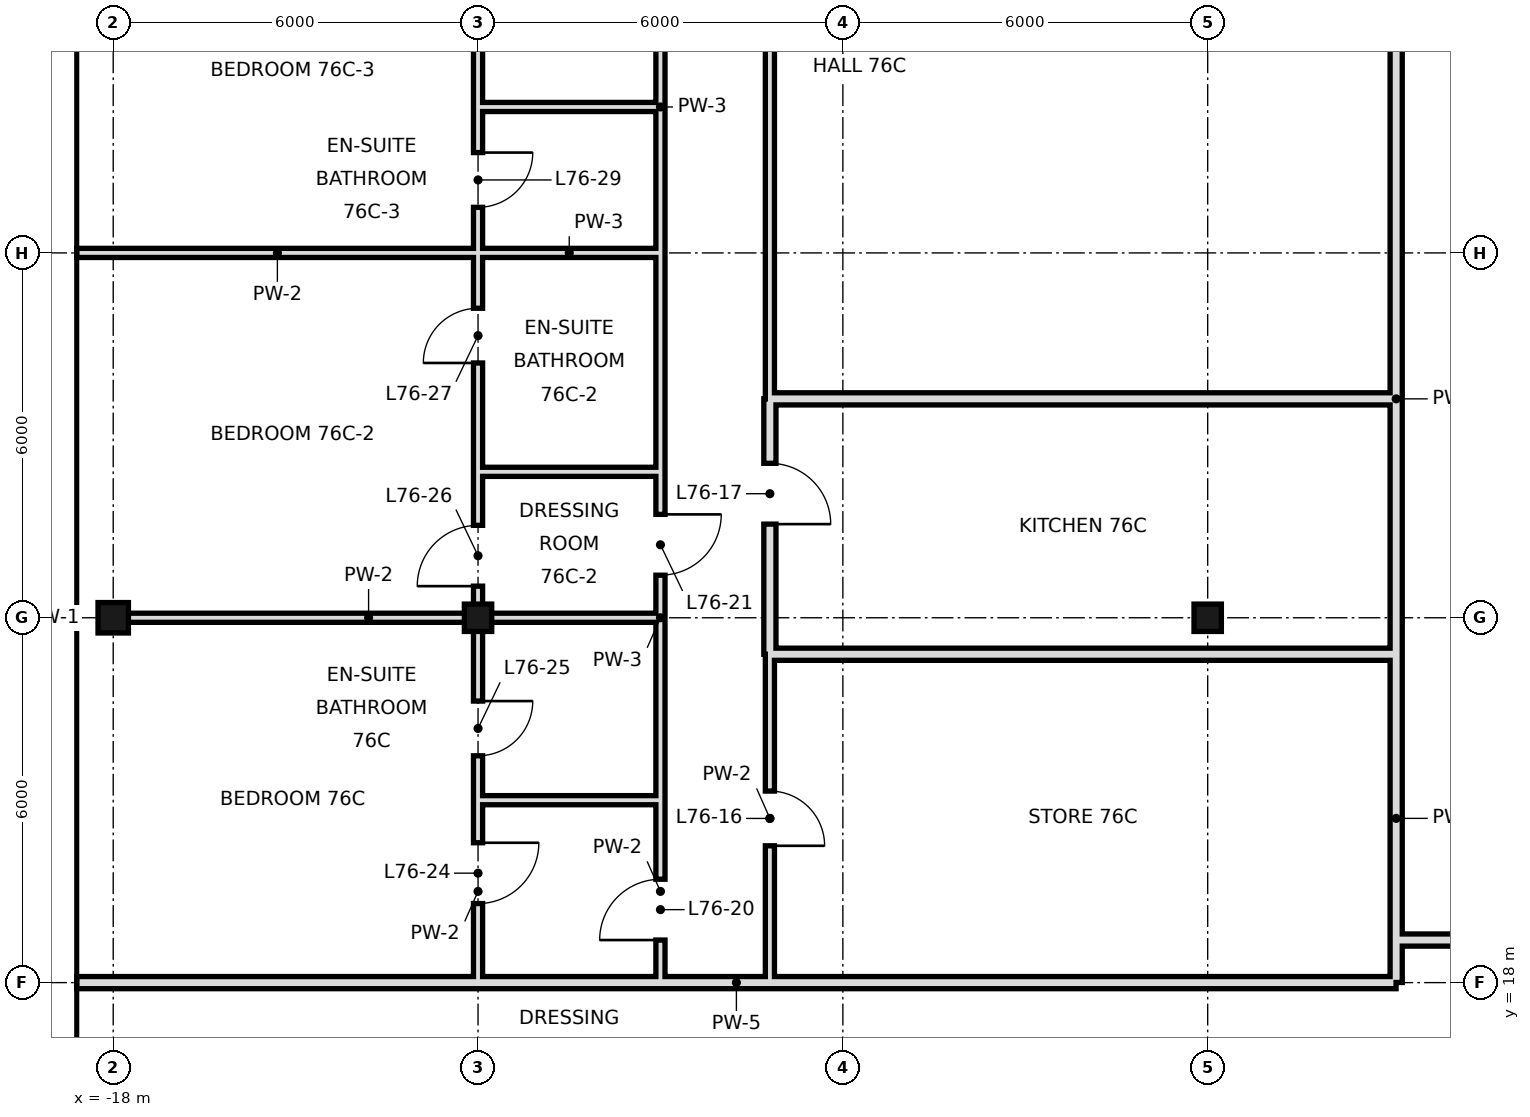
"""IFC4 building model, lengths in metres.
Left out: names, types, materials, properties, quantities, classifications, styles, units other than length and angle.
Written with IfcOpenShell. Run it as: python <this file> out.ifc"""

import sys

from ifc_helpers import new_model, si_unit, direction, frame, frame_2d, origin, origin_2d, place, context, subcontext, project, spatial, rectangle, hollow_rectangle, extrude, element, fill, save


model = new_model("IFC4")
c1 = context("Model", 3, precision=1e-05, world=origin(), true_north=direction((0.0, 1.0)))
c2 = subcontext(c1, "Body", "Model", "MODEL_VIEW")
j1 = project(units=[si_unit("LENGTHUNIT", "METRE"), si_unit("PLANEANGLEUNIT", "RADIAN")], contexts=[c1])
p1 = place(None, origin())
s1 = spatial("IfcSite", under=j1, at=p1, CompositionType="ELEMENT")
p2 = place(p1, origin())
s2 = spatial("IfcBuilding", under=s1, at=p2, CompositionType="ELEMENT")
p3 = place(p2, frame((0.0, 0.0, 319.6)))
s3 = spatial("IfcBuildingStorey", under=s2, at=p3, CompositionType="ELEMENT", Elevation=319.6)
p4 = place(p3, frame((-18.0, 24.0, 0.0), z_axis=(0.0, 0.0, 1.0), x_axis=(1.0, 0.0, 0.0)))
e1 = element("IfcColumn", 1, at=p4, inside=s3, PredefinedType="COLUMN", context=c2, shape_type="SweptSolid", body=[
    extrude(hollow_rectangle(XDim=0.5, YDim=0.5, WallThickness=0.025, at=origin_2d()), origin(), (0.0, 0.0, 1.0), 3.6),
])
for number, where, z_axis, x_axis in (
    (2, (-12.0, 24.0, 0.0), (0.0, 0.0, 1.0), (1.0, 0.0, 0.0)),
    (3, (0.0, 24.0, 0.0), (0.0, 0.0, 1.0), (1.0, 0.0, 0.0)),
):
    element("IfcColumn", number, at=place(p3, frame(where, z_axis=z_axis, x_axis=x_axis)), inside=s3, PredefinedType="COLUMN", context=c2, shape_type="SweptSolid", body=[
        extrude(hollow_rectangle(XDim=0.45, YDim=0.45, WallThickness=0.022, at=origin_2d()), origin(), (0.0, 0.0, 1.0), 3.6),
    ])
p5 = place(p3, frame((-12.0, 18.0, 0.0), z_axis=(0.0, 0.0, 1.0), x_axis=(0.0, 1.0, 0.0)))
e4 = element("IfcWall", 4, at=p5, inside=s3, PredefinedType="PARTITIONING", context=c2, shape_type="SweptSolid", body=[
    extrude(rectangle(XDim=3.0, YDim=0.15, at=frame_2d((1.5, 0.0))), origin(), (0.0, 0.0, 1.0), 2.72),
])
p6 = place(p5, frame((1.3, 0.0, 0.0)))
e5 = element("IfcOpeningElement", 5, at=p6, cuts=e4, PredefinedType="OPENING", context=c2, shape_type="SweptSolid", body=[
    extrude(rectangle(XDim=1.0, YDim=2.4, at=frame_2d((0.5, 1.2))), frame((0.0, 0.085, 0.0), z_axis=(0.0, -1.0, 0.0), x_axis=(1.0, 0.0, 0.0)), (0.0, 0.0, 1.0), 0.17),
])
p7 = place(p3, frame((-12.0, 24.0, 0.0), z_axis=(0.0, 0.0, 1.0), x_axis=(0.0, 1.0, 0.0)))
e6 = element("IfcWall", 6, at=p7, inside=s3, PredefinedType="PARTITIONING", context=c2, shape_type="SweptSolid", body=[
    extrude(rectangle(XDim=2.4, YDim=0.15, at=frame_2d((1.2, 0.0))), origin(), (0.0, 0.0, 1.0), 2.72),
])
p8 = place(p7, frame((0.52, 0.0, 0.0)))
e7 = element("IfcOpeningElement", 7, at=p8, cuts=e6, PredefinedType="OPENING", context=c2, shape_type="SweptSolid", body=[
    extrude(rectangle(XDim=1.0, YDim=2.4, at=frame_2d((0.5, 1.2))), frame((0.0, 0.085, 0.0), z_axis=(0.0, -1.0, 0.0), x_axis=(1.0, 0.0, 0.0)), (0.0, 0.0, 1.0), 0.17),
])
p9 = place(p3, frame((-12.0, 32.4, 0.0), z_axis=(0.0, 0.0, 1.0), x_axis=(0.0, 1.0, 0.0)))
e8 = element("IfcWall", 8, at=p9, inside=s3, PredefinedType="PARTITIONING", context=c2, shape_type="SweptSolid", body=[
    extrude(rectangle(XDim=15.6, YDim=0.15, at=frame_2d((7.8, 0.0))), origin(), (0.0, 0.0, 1.0), 2.72),
])
p10 = place(p9, frame((1.3, 0.0, 0.0)))
e9 = element("IfcOpeningElement", 9, at=p10, cuts=e8, PredefinedType="OPENING", context=c2, shape_type="SweptSolid", body=[
    extrude(rectangle(XDim=1.0, YDim=2.4, at=frame_2d((0.5, 1.2))), frame((0.0, 0.085, 0.0), z_axis=(0.0, -1.0, 0.0), x_axis=(1.0, 0.0, 0.0)), (0.0, 0.0, 1.0), 0.17),
])
p11 = place(p9, frame((8.7, 0.0, 0.0)))
e10 = element("IfcOpeningElement", 10, at=p11, cuts=e8, PredefinedType="OPENING", context=c2, shape_type="SweptSolid", body=[
    extrude(rectangle(XDim=1.8, YDim=2.4, at=frame_2d((0.9, 1.2))), frame((0.0, 0.085, 0.0), z_axis=(0.0, -1.0, 0.0), x_axis=(1.0, 0.0, 0.0)), (0.0, 0.0, 1.0), 0.17),
])
p12 = place(p3, frame((-12.0, 21.0, 0.0), z_axis=(0.0, 0.0, 1.0), x_axis=(0.0, 1.0, 0.0)))
e11 = element("IfcWall", 11, at=p12, inside=s3, PredefinedType="PARTITIONING", context=c2, shape_type="SweptSolid", body=[
    extrude(rectangle(XDim=3.0, YDim=0.15, at=frame_2d((1.5, 0.0))), origin(), (0.0, 0.0, 1.0), 2.72),
])
p13 = place(p12, frame((0.73, 0.0, 0.0)))
e12 = element("IfcOpeningElement", 12, at=p13, cuts=e11, PredefinedType="OPENING", context=c2, shape_type="SweptSolid", body=[
    extrude(rectangle(XDim=0.9, YDim=2.4, at=frame_2d((0.45, 1.2))), frame((0.0, 0.085, 0.0), z_axis=(0.0, -1.0, 0.0), x_axis=(1.0, 0.0, 0.0)), (0.0, 0.0, 1.0), 0.17),
])
p14 = place(p3, frame((-12.0, 26.4, 0.0), z_axis=(0.0, 0.0, 1.0), x_axis=(0.0, 1.0, 0.0)))
e13 = element("IfcWall", 13, at=p14, inside=s3, PredefinedType="PARTITIONING", context=c2, shape_type="SweptSolid", body=[
    extrude(rectangle(XDim=6.0, YDim=0.15, at=frame_2d((3.0, 0.0))), origin(), (0.0, 0.0, 1.0), 2.72),
])
p15 = place(p14, frame((1.79, 0.0, 0.0)))
e14 = element("IfcOpeningElement", 14, at=p15, cuts=e13, PredefinedType="OPENING", context=c2, shape_type="SweptSolid", body=[
    extrude(rectangle(XDim=0.9, YDim=2.4, at=frame_2d((0.45, 1.2))), frame((0.0, 0.085, 0.0), z_axis=(0.0, -1.0, 0.0), x_axis=(1.0, 0.0, 0.0)), (0.0, 0.0, 1.0), 0.17),
])
p16 = place(p14, frame((4.35, 0.0, 0.0)))
e15 = element("IfcOpeningElement", 15, at=p16, cuts=e13, PredefinedType="OPENING", context=c2, shape_type="SweptSolid", body=[
    extrude(rectangle(XDim=0.9, YDim=2.4, at=frame_2d((0.45, 1.2))), frame((0.0, 0.085, 0.0), z_axis=(0.0, -1.0, 0.0), x_axis=(1.0, 0.0, 0.0)), (0.0, 0.0, 1.0), 0.17),
])
p17 = place(p3, frame((-7.2, 23.4, 0.0), z_axis=(0.0, 0.0, 1.0), x_axis=(0.0, 1.0, 0.0)))
e16 = element("IfcWall", 16, at=p17, inside=s3, PredefinedType="SOLIDWALL", context=c2, shape_type="SweptSolid", body=[
    extrude(rectangle(XDim=4.2, YDim=0.2, at=frame_2d((2.1, 0.0))), origin(), (0.0, 0.0, 1.0), 2.72),
])
p18 = place(p17, frame((2.14, 0.0, 0.0)))
e17 = element("IfcOpeningElement", 17, at=p18, cuts=e16, PredefinedType="OPENING", context=c2, shape_type="SweptSolid", body=[
    extrude(rectangle(XDim=1.0, YDim=2.4, at=frame_2d((0.5, 1.2))), frame((0.0, 0.11, 0.0), z_axis=(0.0, -1.0, 0.0), x_axis=(1.0, 0.0, 0.0)), (0.0, 0.0, 1.0), 0.22),
])
p19 = place(p3, frame((-7.2, 18.0, 0.0), z_axis=(0.0, 0.0, 1.0), x_axis=(0.0, 1.0, 0.0)))
e18 = element("IfcWall", 18, at=p19, inside=s3, PredefinedType="PARTITIONING", context=c2, shape_type="SweptSolid", body=[
    extrude(rectangle(XDim=5.4, YDim=0.15, at=frame_2d((2.7, 0.0))), origin(), (0.0, 0.0, 1.0), 3.42),
])
p20 = place(p19, frame((2.25, 0.0, 0.0)))
e19 = element("IfcOpeningElement", 19, at=p20, cuts=e18, PredefinedType="OPENING", context=c2, shape_type="SweptSolid", body=[
    extrude(rectangle(XDim=0.9, YDim=2.1, at=frame_2d((0.45, 1.05))), frame((0.0, 0.085, 0.0), z_axis=(0.0, -1.0, 0.0), x_axis=(1.0, 0.0, 0.0)), (0.0, 0.0, 1.0), 0.17),
])
p21 = place(p3, frame((-7.2, 27.6, 0.0), z_axis=(0.0, 0.0, 1.0), x_axis=(0.0, 1.0, 0.0)))
e20 = element("IfcWall", 20, at=p21, inside=s3, PredefinedType="PARTITIONING", context=c2, shape_type="SweptSolid", body=[
    extrude(rectangle(XDim=18.0, YDim=0.15, at=frame_2d((9.0, 0.0))), origin(), (0.0, 0.0, 1.0), 3.42),
])
p22 = place(p21, frame((15.4, 0.0, 0.0)))
e21 = element("IfcOpeningElement", 21, at=p22, cuts=e20, PredefinedType="OPENING", context=c2, shape_type="SweptSolid", body=[
    extrude(rectangle(XDim=1.0, YDim=2.4, at=frame_2d((0.5, 1.2))), frame((0.0, 0.085, 0.0), z_axis=(0.0, -1.0, 0.0), x_axis=(1.0, 0.0, 0.0)), (0.0, 0.0, 1.0), 0.17),
])
p23 = place(p21, frame((7.6, 0.0, 0.0)))
e22 = element("IfcOpeningElement", 22, at=p23, cuts=e20, PredefinedType="OPENING", context=c2, shape_type="SweptSolid", body=[
    extrude(rectangle(XDim=1.0, YDim=2.4, at=frame_2d((0.5, 1.2))), frame((0.0, 0.085, 0.0), z_axis=(0.0, -1.0, 0.0), x_axis=(1.0, 0.0, 0.0)), (0.0, 0.0, 1.0), 0.17),
])
p24 = place(p3, frame((-9.0, 18.0, 0.0), z_axis=(0.0, 0.0, 1.0), x_axis=(0.0, 1.0, 0.0)))
e23 = element("IfcWall", 23, at=p24, inside=s3, PredefinedType="PARTITIONING", context=c2, shape_type="SweptSolid", body=[
    extrude(rectangle(XDim=3.0, YDim=0.15, at=frame_2d((1.5, 0.0))), origin(), (0.0, 0.0, 1.0), 3.42),
])
p25 = place(p24, frame((0.7, 0.0, 0.0)))
e24 = element("IfcOpeningElement", 24, at=p25, cuts=e23, PredefinedType="OPENING", context=c2, shape_type="SweptSolid", body=[
    extrude(rectangle(XDim=1.0, YDim=2.4, at=frame_2d((0.5, 1.2))), frame((0.0, 0.085, 0.0), z_axis=(0.0, -1.0, 0.0), x_axis=(1.0, 0.0, 0.0)), (0.0, 0.0, 1.0), 0.17),
])
p26 = place(p3, frame((-9.0, 24.0, 0.0), z_axis=(0.0, 0.0, 1.0), x_axis=(0.0, 1.0, 0.0)))
e25 = element("IfcWall", 25, at=p26, inside=s3, PredefinedType="PARTITIONING", context=c2, shape_type="SweptSolid", body=[
    extrude(rectangle(XDim=2.4, YDim=0.15, at=frame_2d((1.2, 0.0))), origin(), (0.0, 0.0, 1.0), 3.42),
])
p27 = place(p26, frame((0.7, 0.0, 0.0)))
e26 = element("IfcOpeningElement", 26, at=p27, cuts=e25, PredefinedType="OPENING", context=c2, shape_type="SweptSolid", body=[
    extrude(rectangle(XDim=1.0, YDim=2.4, at=frame_2d((0.5, 1.2))), frame((0.0, 0.085, 0.0), z_axis=(0.0, -1.0, 0.0), x_axis=(1.0, 0.0, 0.0)), (0.0, 0.0, 1.0), 0.17),
])
p28 = place(p3, frame((-9.0, 32.4, 0.0), z_axis=(0.0, 0.0, 1.0), x_axis=(0.0, 1.0, 0.0)))
e27 = element("IfcWall", 27, at=p28, inside=s3, PredefinedType="PARTITIONING", context=c2, shape_type="SweptSolid", body=[
    extrude(rectangle(XDim=16.2, YDim=0.15, at=frame_2d((8.1, 0.0))), origin(), (0.0, 0.0, 1.0), 3.42),
])
p29 = place(p28, frame((1.3, 0.0, 0.0)))
e28 = element("IfcOpeningElement", 28, at=p29, cuts=e27, PredefinedType="OPENING", context=c2, shape_type="SweptSolid", body=[
    extrude(rectangle(XDim=1.0, YDim=2.4, at=frame_2d((0.5, 1.2))), frame((0.0, 0.085, 0.0), z_axis=(0.0, -1.0, 0.0), x_axis=(1.0, 0.0, 0.0)), (0.0, 0.0, 1.0), 0.17),
])
p30 = place(p28, frame((6.76, 0.0, 0.0)))
e29 = element("IfcOpeningElement", 29, at=p30, cuts=e27, PredefinedType="OPENING", context=c2, shape_type="SweptSolid", body=[
    extrude(rectangle(XDim=1.8, YDim=2.4, at=frame_2d((0.9, 1.2))), frame((0.0, 0.085, 0.0), z_axis=(0.0, -1.0, 0.0), x_axis=(1.0, 0.0, 0.0)), (0.0, 0.0, 1.0), 0.17),
])
p31 = place(p3, frame((-9.0, 21.0, 0.0), z_axis=(0.0, 0.0, 1.0), x_axis=(0.0, 1.0, 0.0)))
e30 = element("IfcWall", 30, at=p31, inside=s3, PredefinedType="PARTITIONING", context=c2, shape_type="SweptSolid", body=[
    extrude(rectangle(XDim=3.0, YDim=0.15, at=frame_2d((1.5, 0.0))), origin(), (0.0, 0.0, 1.0), 3.42),
])
p32 = place(p3, frame((-9.0, 26.4, 0.0), z_axis=(0.0, 0.0, 1.0), x_axis=(0.0, 1.0, 0.0)))
e31 = element("IfcWall", 31, at=p32, inside=s3, PredefinedType="PARTITIONING", context=c2, shape_type="SweptSolid", body=[
    extrude(rectangle(XDim=6.0, YDim=0.15, at=frame_2d((3.0, 0.0))), origin(), (0.0, 0.0, 1.0), 3.42),
])
p33 = place(p3, frame((3.1, 18.002, 0.0), z_axis=(0.0, 0.0, 1.0), x_axis=(0.0, 1.0, 0.0)))
e32 = element("IfcWall", 32, at=p33, inside=s3, PredefinedType="SOLIDWALL", context=c2, shape_type="SweptSolid", body=[
    extrude(rectangle(XDim=5.398, YDim=0.2, at=frame_2d((2.699, 0.0))), origin(), (0.0, 0.0, 1.0), 3.42),
])
p34 = place(p3, frame((3.1, 27.6, 0.0), z_axis=(0.0, 0.0, 1.0), x_axis=(0.0, 1.0, 0.0)))
e33 = element("IfcWall", 33, at=p34, inside=s3, PredefinedType="SOLIDWALL", context=c2, shape_type="SweptSolid", body=[
    extrude(rectangle(XDim=21.0, YDim=0.2, at=frame_2d((10.5, 0.0))), origin(), (0.0, 0.0, 1.0), 2.72),
])
p35 = place(p34, frame((13.54, 0.0, 0.0)))
e34 = element("IfcOpeningElement", 34, at=p35, cuts=e33, PredefinedType="OPENING", context=c2, shape_type="SweptSolid", body=[
    extrude(rectangle(XDim=1.2, YDim=2.4, at=frame_2d((0.6, 1.2))), frame((0.0, 0.11, 0.0), z_axis=(0.0, -1.0, 0.0), x_axis=(1.0, 0.0, 0.0)), (0.0, 0.0, 1.0), 0.22),
])
p36 = place(p3, frame((3.1, 23.4, 0.0), z_axis=(0.0, 0.0, 1.0), x_axis=(0.0, 1.0, 0.0)))
e35 = element("IfcWall", 35, at=p36, inside=s3, PredefinedType="SOLIDWALL", context=c2, shape_type="SweptSolid", body=[
    extrude(rectangle(XDim=4.2, YDim=0.2, at=frame_2d((2.1, 0.0))), origin(), (0.0, 0.0, 1.0), 3.42),
])
p37 = place(p3, frame((-18.6, 18.0, 0.0), z_axis=(0.0, 0.0, 1.0), x_axis=(1.0, 0.0, 0.0)))
e36 = element("IfcWall", 36, at=p37, inside=s3, PredefinedType="SOLIDWALL", context=c2, shape_type="SweptSolid", body=[
    extrude(rectangle(XDim=21.698, YDim=0.2, at=frame_2d((10.849, 0.0))), origin(), (0.0, 0.0, 1.0), 2.72),
])
p38 = place(p3, frame((3.1, 18.7, 0.0), z_axis=(0.0, 0.0, 1.0), x_axis=(1.0, 0.0, 0.0)))
e37 = element("IfcWall", 37, at=p38, inside=s3, PredefinedType="SOLIDWALL", context=c2, shape_type="SweptSolid", body=[
    extrude(rectangle(XDim=40.7, YDim=0.2, at=frame_2d((20.35, 0.0))), origin(), (0.0, 0.0, 1.0), 2.72),
])
p39 = place(p38, frame((25.44, 0.0, 0.0)))
e38 = element("IfcOpeningElement", 38, at=p39, cuts=e37, PredefinedType="OPENING", context=c2, shape_type="SweptSolid", body=[
    extrude(rectangle(XDim=1.2, YDim=2.4, at=frame_2d((0.6, 1.2))), frame((0.0, 0.11, 0.0), z_axis=(0.0, -1.0, 0.0), x_axis=(1.0, 0.0, 0.0)), (0.0, 0.0, 1.0), 0.22),
])
p40 = place(p38, frame((6.55, 0.0, 0.0)))
e39 = element("IfcOpeningElement", 39, at=p40, cuts=e37, PredefinedType="OPENING", context=c2, shape_type="SweptSolid", body=[
    extrude(rectangle(XDim=1.8, YDim=2.4, at=frame_2d((0.9, 1.2))), frame((0.0, 0.11, 0.0), z_axis=(0.0, -1.0, 0.0), x_axis=(1.0, 0.0, 0.0)), (0.0, 0.0, 1.0), 0.22),
])
p41 = place(p3, frame((-12.0, 21.0, 0.0), z_axis=(0.0, 0.0, 1.0), x_axis=(1.0, 0.0, 0.0)))
e40 = element("IfcWall", 40, at=p41, inside=s3, PredefinedType="PARTITIONING", context=c2, shape_type="SweptSolid", body=[
    extrude(rectangle(XDim=3.0, YDim=0.15, at=frame_2d((1.5, 0.0))), origin(), (0.0, 0.0, 1.0), 3.42),
])
p42 = place(p3, frame((-7.2, 23.4, 0.0), z_axis=(0.0, 0.0, 1.0), x_axis=(1.0, 0.0, 0.0)))
e41 = element("IfcWall", 41, at=p42, inside=s3, PredefinedType="SOLIDWALL", context=c2, shape_type="SweptSolid", body=[
    extrude(rectangle(XDim=10.3, YDim=0.2, at=frame_2d((5.15, 0.0))), origin(), (0.0, 0.0, 1.0), 2.72),
])
p43 = place(p3, frame((-18.0, 24.0, 0.0), z_axis=(0.0, 0.0, 1.0), x_axis=(1.0, 0.0, 0.0)))
e42 = element("IfcWall", 42, at=p43, inside=s3, PredefinedType="PARTITIONING", context=c2, shape_type="SweptSolid", body=[
    extrude(rectangle(XDim=6.0, YDim=0.15, at=frame_2d((3.0, 0.0))), origin(), (0.0, 0.0, 1.0), 2.97),
])
p44 = place(p3, frame((-12.0, 24.0, 0.0), z_axis=(0.0, 0.0, 1.0), x_axis=(1.0, 0.0, 0.0)))
e43 = element("IfcWall", 43, at=p44, inside=s3, PredefinedType="PARTITIONING", context=c2, shape_type="SweptSolid", body=[
    extrude(rectangle(XDim=3.0, YDim=0.15, at=frame_2d((1.5, 0.0))), origin(), (0.0, 0.0, 1.0), 2.72),
])
p45 = place(p3, frame((-12.0, 26.4, 0.0), z_axis=(0.0, 0.0, 1.0), x_axis=(1.0, 0.0, 0.0)))
e44 = element("IfcWall", 44, at=p45, inside=s3, PredefinedType="PARTITIONING", context=c2, shape_type="SweptSolid", body=[
    extrude(rectangle(XDim=3.0, YDim=0.15, at=frame_2d((1.5, 0.0))), origin(), (0.0, 0.0, 1.0), 3.42),
])
p46 = place(p3, frame((-7.2, 27.6, 0.0), z_axis=(0.0, 0.0, 1.0), x_axis=(1.0, 0.0, 0.0)))
e45 = element("IfcWall", 45, at=p46, inside=s3, PredefinedType="SOLIDWALL", context=c2, shape_type="SweptSolid", body=[
    extrude(rectangle(XDim=10.3, YDim=0.2, at=frame_2d((5.15, 0.0))), origin(), (0.0, 0.0, 1.0), 2.72),
])
p47 = place(p3, frame((-18.6, 30.0, 0.0), z_axis=(0.0, 0.0, 1.0), x_axis=(1.0, 0.0, 0.0)))
e46 = element("IfcWall", 46, at=p47, inside=s3, PredefinedType="PARTITIONING", context=c2, shape_type="SweptSolid", body=[
    extrude(rectangle(XDim=6.6, YDim=0.15, at=frame_2d((3.3, 0.0))), origin(), (0.0, 0.0, 1.0), 2.97),
])
p48 = place(p3, frame((-12.0, 30.0, 0.0), z_axis=(0.0, 0.0, 1.0), x_axis=(1.0, 0.0, 0.0)))
e47 = element("IfcWall", 47, at=p48, inside=s3, PredefinedType="PARTITIONING", context=c2, shape_type="SweptSolid", body=[
    extrude(rectangle(XDim=3.0, YDim=0.15, at=frame_2d((1.5, 0.0))), origin(), (0.0, 0.0, 1.0), 2.72),
])
p49 = place(p3, frame((-12.0, 32.4, 0.0), z_axis=(0.0, 0.0, 1.0), x_axis=(1.0, 0.0, 0.0)))
e48 = element("IfcWall", 48, at=p49, inside=s3, PredefinedType="PARTITIONING", context=c2, shape_type="SweptSolid", body=[
    extrude(rectangle(XDim=3.0, YDim=0.15, at=frame_2d((1.5, 0.0))), origin(), (0.0, 0.0, 1.0), 3.42),
])
p50 = place(p20, frame((0.9, 0.0, 0.0), z_axis=(0.0, 0.0, 1.0), x_axis=(-1.0, 0.0, 0.0)))
e49 = element("IfcDoor", 49, at=p50, inside=s3, OperationType="SINGLE_SWING_RIGHT", PredefinedType="DOOR", context=c2, shape_type="SweptSolid", body=[
    extrude(rectangle(XDim=0.9, YDim=2.1, at=frame_2d((0.45, 1.05))), frame((0.0, 0.025, 0.0), z_axis=(0.0, -1.0, 0.0), x_axis=(1.0, 0.0, 0.0)), (0.0, 0.0, 1.0), 0.05),
])
fill(e19, e49)
p51 = place(p18, frame((1.0, 0.0, 0.0), z_axis=(0.0, 0.0, 1.0), x_axis=(-1.0, 0.0, 0.0)))
e50 = element("IfcDoor", 50, at=p51, inside=s3, OperationType="SINGLE_SWING_RIGHT", PredefinedType="DOOR", context=c2, shape_type="SweptSolid", body=[
    extrude(rectangle(XDim=1.0, YDim=2.4, at=frame_2d((0.5, 1.2))), frame((0.0, 0.025, 0.0), z_axis=(0.0, -1.0, 0.0), x_axis=(1.0, 0.0, 0.0)), (0.0, 0.0, 1.0), 0.05),
])
fill(e17, e50)
p52 = place(p25, origin())
e51 = element("IfcDoor", 51, at=p52, inside=s3, OperationType="SINGLE_SWING_LEFT", PredefinedType="DOOR", context=c2, shape_type="SweptSolid", body=[
    extrude(rectangle(XDim=1.0, YDim=2.4, at=frame_2d((0.5, 1.2))), frame((0.0, 0.025, 0.0), z_axis=(0.0, -1.0, 0.0), x_axis=(1.0, 0.0, 0.0)), (0.0, 0.0, 1.0), 0.05),
])
fill(e24, e51)
p53 = place(p27, origin())
e52 = element("IfcDoor", 52, at=p53, inside=s3, OperationType="SINGLE_SWING_RIGHT", PredefinedType="DOOR", context=c2, shape_type="SweptSolid", body=[
    extrude(rectangle(XDim=1.0, YDim=2.4, at=frame_2d((0.5, 1.2))), frame((0.0, 0.025, 0.0), z_axis=(0.0, -1.0, 0.0), x_axis=(1.0, 0.0, 0.0)), (0.0, 0.0, 1.0), 0.05),
])
fill(e26, e52)
p54 = place(p6, origin())
e53 = element("IfcDoor", 53, at=p54, inside=s3, OperationType="SINGLE_SWING_RIGHT", PredefinedType="DOOR", context=c2, shape_type="SweptSolid", body=[
    extrude(rectangle(XDim=1.0, YDim=2.4, at=frame_2d((0.5, 1.2))), frame((0.0, 0.025, 0.0), z_axis=(0.0, -1.0, 0.0), x_axis=(1.0, 0.0, 0.0)), (0.0, 0.0, 1.0), 0.05),
])
fill(e5, e53)
p55 = place(p13, origin())
e54 = element("IfcDoor", 54, at=p55, inside=s3, OperationType="SINGLE_SWING_RIGHT", PredefinedType="DOOR", context=c2, shape_type="SweptSolid", body=[
    extrude(rectangle(XDim=0.9, YDim=2.4, at=frame_2d((0.45, 1.2))), frame((0.0, 0.025, 0.0), z_axis=(0.0, -1.0, 0.0), x_axis=(1.0, 0.0, 0.0)), (0.0, 0.0, 1.0), 0.05),
])
fill(e12, e54)
p56 = place(p8, origin())
e55 = element("IfcDoor", 55, at=p56, inside=s3, OperationType="SINGLE_SWING_LEFT", PredefinedType="DOOR", context=c2, shape_type="SweptSolid", body=[
    extrude(rectangle(XDim=1.0, YDim=2.4, at=frame_2d((0.5, 1.2))), frame((0.0, 0.025, 0.0), z_axis=(0.0, -1.0, 0.0), x_axis=(1.0, 0.0, 0.0)), (0.0, 0.0, 1.0), 0.05),
])
fill(e7, e55)
p57 = place(p15, origin())
e56 = element("IfcDoor", 56, at=p57, inside=s3, OperationType="SINGLE_SWING_LEFT", PredefinedType="DOOR", context=c2, shape_type="SweptSolid", body=[
    extrude(rectangle(XDim=0.9, YDim=2.4, at=frame_2d((0.45, 1.2))), frame((0.0, 0.025, 0.0), z_axis=(0.0, -1.0, 0.0), x_axis=(1.0, 0.0, 0.0)), (0.0, 0.0, 1.0), 0.05),
])
fill(e14, e56)
p58 = place(p16, origin())
e57 = element("IfcDoor", 57, at=p58, inside=s3, OperationType="SINGLE_SWING_RIGHT", PredefinedType="DOOR", context=c2, shape_type="SweptSolid", body=[
    extrude(rectangle(XDim=0.9, YDim=2.4, at=frame_2d((0.45, 1.2))), frame((0.0, 0.025, 0.0), z_axis=(0.0, -1.0, 0.0), x_axis=(1.0, 0.0, 0.0)), (0.0, 0.0, 1.0), 0.05),
])
fill(e15, e57)
save(model, sys.argv[1])
